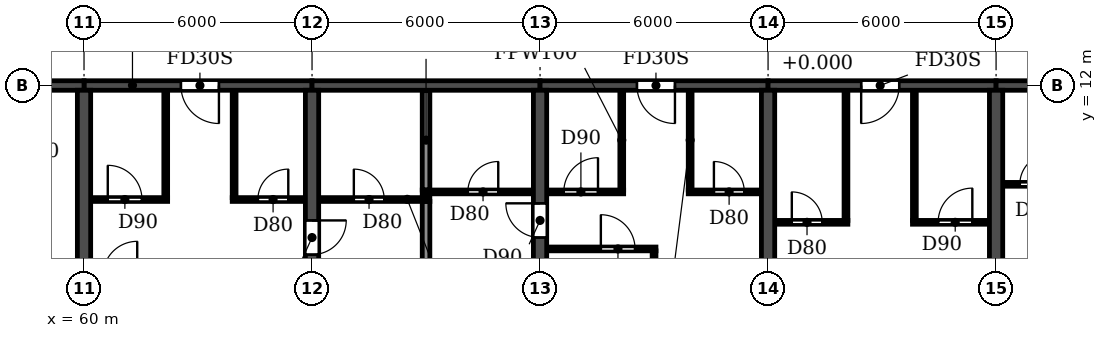
"""IFC4 building model, lengths in metres.
Left out: names, types, materials, properties, quantities, classifications, styles, units other than length and angle.
Written with IfcOpenShell. Run it as: python <this file> out.ifc"""

import sys

from ifc_helpers import new_model, si_unit, direction, frame, frame_2d, origin, place, context, subcontext, project, spatial, rectangle, extrude, element, fill, save


model = new_model("IFC4")
c1 = context("Model", 3, precision=1e-05, world=origin(), true_north=direction((0.0, 1.0)))
c2 = subcontext(c1, "Body", "Model", "MODEL_VIEW")
j1 = project(units=[si_unit("LENGTHUNIT", "METRE"), si_unit("PLANEANGLEUNIT", "RADIAN")], contexts=[c1])
p1 = place(None, origin())
s1 = spatial("IfcSite", under=j1, at=p1, CompositionType="ELEMENT")
p2 = place(p1, origin())
s2 = spatial("IfcBuilding", under=s1, at=p2, CompositionType="ELEMENT")
p3 = place(p2, frame((0.0, 0.0, 82.8)))
s3 = spatial("IfcBuildingStorey", under=s2, at=p3, CompositionType="ELEMENT", Elevation=82.8)
p4 = place(p3, frame((60.0, 0.2, 0.0), z_axis=(0.0, 0.0, 1.0), x_axis=(0.0, 1.0, 0.0)))
e1 = element("IfcWall", 1, at=p4, inside=s3, PredefinedType="SHEAR", context=c2, shape_type="SweptSolid", body=[
    extrude(rectangle(XDim=11.675, YDim=0.35, at=frame_2d((5.837, 0.0))), origin(), (0.0, 0.0, 1.0), 3.06),
])
p5 = place(p3, frame((66.0, 0.2, 0.0), z_axis=(0.0, 0.0, 1.0), x_axis=(0.0, 1.0, 0.0)))
e2 = element("IfcWall", 2, at=p5, inside=s3, PredefinedType="SHEAR", context=c2, shape_type="SweptSolid", body=[
    extrude(rectangle(XDim=11.675, YDim=0.35, at=frame_2d((5.837, 0.0))), origin(), (0.0, 0.0, 1.0), 3.06),
])
p6 = place(p5, frame((7.35, 0.0, 0.0)))
e3 = element("IfcOpeningElement", 3, at=p6, cuts=e2, PredefinedType="OPENING", context=c2, shape_type="SweptSolid", body=[
    extrude(rectangle(XDim=0.9, YDim=2.1, at=frame_2d((0.45, 1.05))), frame((0.0, 0.185, 0.0), z_axis=(0.0, -1.0, 0.0), x_axis=(1.0, 0.0, 0.0)), (0.0, 0.0, 1.0), 0.37),
])
p7 = place(p3, frame((72.0, 0.2, 0.0), z_axis=(0.0, 0.0, 1.0), x_axis=(0.0, 1.0, 0.0)))
e4 = element("IfcWall", 4, at=p7, inside=s3, PredefinedType="SHEAR", context=c2, shape_type="SweptSolid", body=[
    extrude(rectangle(XDim=11.675, YDim=0.35, at=frame_2d((5.837, 0.0))), origin(), (0.0, 0.0, 1.0), 3.06),
])
p8 = place(p7, frame((7.8, 0.0, 0.0)))
e5 = element("IfcOpeningElement", 5, at=p8, cuts=e4, PredefinedType="OPENING", context=c2, shape_type="SweptSolid", body=[
    extrude(rectangle(XDim=0.9, YDim=2.1, at=frame_2d((0.45, 1.05))), frame((0.0, 0.185, 0.0), z_axis=(0.0, -1.0, 0.0), x_axis=(1.0, 0.0, 0.0)), (0.0, 0.0, 1.0), 0.37),
])
for number, where, z_axis, x_axis in (
    (6, (78.0, 0.2, 0.0), (0.0, 0.0, 1.0), (0.0, 1.0, 0.0)),
    (7, (84.0, 0.2, 0.0), (0.0, 0.0, 1.0), (0.0, 1.0, 0.0)),
):
    element("IfcWall", number, at=place(p3, frame(where, z_axis=z_axis, x_axis=x_axis)), inside=s3, PredefinedType="SHEAR", context=c2, shape_type="SweptSolid", body=[
        extrude(rectangle(XDim=11.675, YDim=0.35, at=frame_2d((5.837, 0.0))), origin(), (0.0, 0.0, 1.0), 3.06),
    ])
p9 = place(p3, frame((54.0, 12.0, 0.0), z_axis=(0.0, 0.0, 1.0), x_axis=(1.0, 0.0, 0.0)))
e8 = element("IfcWall", 8, at=p9, inside=s3, PredefinedType="SHEAR", context=c2, shape_type="SweptSolid", body=[
    extrude(rectangle(XDim=6.0, YDim=0.25, at=frame_2d((3.0, 0.0))), origin(), (0.0, 0.0, 1.0), 2.46),
])
p10 = place(p9, frame((2.45, 0.0, 0.0)))
e9 = element("IfcOpeningElement", 9, at=p10, cuts=e8, PredefinedType="OPENING", context=c2, shape_type="SweptSolid", body=[
    extrude(rectangle(XDim=1.0, YDim=2.1, at=frame_2d((0.5, 1.05))), frame((0.0, 0.135, 0.0), z_axis=(0.0, -1.0, 0.0), x_axis=(1.0, 0.0, 0.0)), (0.0, 0.0, 1.0), 0.27),
])
p11 = place(p3, frame((60.0, 12.0, 0.0), z_axis=(0.0, 0.0, 1.0), x_axis=(1.0, 0.0, 0.0)))
e10 = element("IfcWall", 10, at=p11, inside=s3, PredefinedType="SHEAR", context=c2, shape_type="SweptSolid", body=[
    extrude(rectangle(XDim=6.0, YDim=0.25, at=frame_2d((3.0, 0.0))), origin(), (0.0, 0.0, 1.0), 2.46),
])
p12 = place(p11, frame((2.55, 0.0, 0.0)))
e11 = element("IfcOpeningElement", 11, at=p12, cuts=e10, PredefinedType="OPENING", context=c2, shape_type="SweptSolid", body=[
    extrude(rectangle(XDim=1.0, YDim=2.1, at=frame_2d((0.5, 1.05))), frame((0.0, 0.135, 0.0), z_axis=(0.0, -1.0, 0.0), x_axis=(1.0, 0.0, 0.0)), (0.0, 0.0, 1.0), 0.27),
])
p13 = place(p3, frame((66.0, 12.0, 0.0), z_axis=(0.0, 0.0, 1.0), x_axis=(1.0, 0.0, 0.0)))
e12 = element("IfcWall", 12, at=p13, inside=s3, PredefinedType="SHEAR", context=c2, shape_type="SweptSolid", body=[
    extrude(rectangle(XDim=6.0, YDim=0.25, at=frame_2d((3.0, 0.0))), origin(), (0.0, 0.0, 1.0), 2.46),
])
p14 = place(p3, frame((72.0, 12.0, 0.0), z_axis=(0.0, 0.0, 1.0), x_axis=(1.0, 0.0, 0.0)))
e13 = element("IfcWall", 13, at=p14, inside=s3, PredefinedType="SHEAR", context=c2, shape_type="SweptSolid", body=[
    extrude(rectangle(XDim=6.0, YDim=0.25, at=frame_2d((3.0, 0.0))), origin(), (0.0, 0.0, 1.0), 2.46),
])
p15 = place(p14, frame((2.55, 0.0, 0.0)))
e14 = element("IfcOpeningElement", 14, at=p15, cuts=e13, PredefinedType="OPENING", context=c2, shape_type="SweptSolid", body=[
    extrude(rectangle(XDim=1.0, YDim=2.1, at=frame_2d((0.5, 1.05))), frame((0.0, 0.135, 0.0), z_axis=(0.0, -1.0, 0.0), x_axis=(1.0, 0.0, 0.0)), (0.0, 0.0, 1.0), 0.27),
])
p16 = place(p3, frame((78.0, 12.0, 0.0), z_axis=(0.0, 0.0, 1.0), x_axis=(1.0, 0.0, 0.0)))
e15 = element("IfcWall", 15, at=p16, inside=s3, PredefinedType="SHEAR", context=c2, shape_type="SweptSolid", body=[
    extrude(rectangle(XDim=6.0, YDim=0.25, at=frame_2d((3.0, 0.0))), origin(), (0.0, 0.0, 1.0), 2.46),
])
p17 = place(p16, frame((2.45, 0.0, 0.0)))
e16 = element("IfcOpeningElement", 16, at=p17, cuts=e15, PredefinedType="OPENING", context=c2, shape_type="SweptSolid", body=[
    extrude(rectangle(XDim=1.0, YDim=2.1, at=frame_2d((0.5, 1.05))), frame((0.0, 0.135, 0.0), z_axis=(0.0, -1.0, 0.0), x_axis=(1.0, 0.0, 0.0)), (0.0, 0.0, 1.0), 0.27),
])
p18 = place(p3, frame((84.0, 12.0, 0.0), z_axis=(0.0, 0.0, 1.0), x_axis=(1.0, 0.0, 0.0)))
e17 = element("IfcWall", 17, at=p18, inside=s3, PredefinedType="SHEAR", context=c2, shape_type="SweptSolid", body=[
    extrude(rectangle(XDim=6.0, YDim=0.25, at=frame_2d((3.0, 0.0))), origin(), (0.0, 0.0, 1.0), 2.46),
])
p19 = place(p18, frame((2.45, 0.0, 0.0)))
e18 = element("IfcOpeningElement", 18, at=p19, cuts=e17, PredefinedType="OPENING", context=c2, shape_type="SweptSolid", body=[
    extrude(rectangle(XDim=1.0, YDim=2.1, at=frame_2d((0.5, 1.05))), frame((0.0, 0.135, 0.0), z_axis=(0.0, -1.0, 0.0), x_axis=(1.0, 0.0, 0.0)), (0.0, 0.0, 1.0), 0.27),
])
p20 = place(p3, frame((69.0, 0.06, 0.0), z_axis=(0.0, 0.0, 1.0), x_axis=(0.0, 1.0, 0.0)))
e19 = element("IfcWall", 19, at=p20, inside=s3, PredefinedType="PARTITIONING", context=c2, shape_type="SweptSolid", body=[
    extrude(rectangle(XDim=8.89, YDim=0.2, at=frame_2d((4.445, 0.0))), origin(), (0.0, 0.0, 1.0), 3.06),
])
p21 = place(p3, frame((69.0, 9.25, 0.0), z_axis=(0.0, 0.0, 1.0), x_axis=(0.0, 1.0, 0.0)))
e20 = element("IfcWall", 20, at=p21, inside=s3, PredefinedType="PARTITIONING", context=c2, shape_type="SweptSolid", body=[
    extrude(rectangle(XDim=2.615, YDim=0.2, at=frame_2d((1.308, 0.0))), origin(), (0.0, 0.0, 1.0), 3.06),
])
p22 = place(p3, frame((72.185, 7.7, 0.0), z_axis=(0.0, 0.0, 1.0), x_axis=(1.0, 0.0, 0.0)))
e21 = element("IfcWall", 21, at=p22, inside=s3, PredefinedType="PARTITIONING", context=c2, shape_type="SweptSolid", body=[
    extrude(rectangle(XDim=2.865, YDim=0.1, at=frame_2d((1.433, 0.0))), origin(), (0.0, 0.0, 1.0), 3.06),
])
p23 = place(p22, frame((1.415, 0.0, 0.0)))
e22 = element("IfcOpeningElement", 22, at=p23, cuts=e21, PredefinedType="OPENING", context=c2, shape_type="SweptSolid", body=[
    extrude(rectangle(XDim=0.9, YDim=2.1, at=frame_2d((0.45, 1.05))), frame((0.0, 0.06, 0.0), z_axis=(0.0, -1.0, 0.0), x_axis=(1.0, 0.0, 0.0)), (0.0, 0.0, 1.0), 0.12),
])
p24 = place(p3, frame((78.185, 8.4, 0.0), z_axis=(0.0, 0.0, 1.0), x_axis=(1.0, 0.0, 0.0)))
e23 = element("IfcWall", 23, at=p24, inside=s3, PredefinedType="PARTITIONING", context=c2, shape_type="SweptSolid", body=[
    extrude(rectangle(XDim=1.915, YDim=0.1, at=frame_2d((0.958, 0.0))), origin(), (0.0, 0.0, 1.0), 3.06),
])
p25 = place(p24, frame((0.44, 0.0, 0.0)))
e24 = element("IfcOpeningElement", 24, at=p25, cuts=e23, PredefinedType="OPENING", context=c2, shape_type="SweptSolid", body=[
    extrude(rectangle(XDim=0.8, YDim=2.1, at=frame_2d((0.4, 1.05))), frame((0.0, 0.06, 0.0), z_axis=(0.0, -1.0, 0.0), x_axis=(1.0, 0.0, 0.0)), (0.0, 0.0, 1.0), 0.12),
])
p26 = place(p3, frame((81.8, 8.4, 0.0), z_axis=(0.0, 0.0, 1.0), x_axis=(1.0, 0.0, 0.0)))
e25 = element("IfcWall", 25, at=p26, inside=s3, PredefinedType="PARTITIONING", context=c2, shape_type="SweptSolid", body=[
    extrude(rectangle(XDim=2.015, YDim=0.1, at=frame_2d((1.007, 0.0))), origin(), (0.0, 0.0, 1.0), 3.06),
])
p27 = place(p26, frame((0.675, 0.0, 0.0)))
e26 = element("IfcOpeningElement", 26, at=p27, cuts=e25, PredefinedType="OPENING", context=c2, shape_type="SweptSolid", body=[
    extrude(rectangle(XDim=0.9, YDim=2.1, at=frame_2d((0.45, 1.05))), frame((0.0, 0.06, 0.0), z_axis=(0.0, -1.0, 0.0), x_axis=(1.0, 0.0, 0.0)), (0.0, 0.0, 1.0), 0.12),
])
p28 = place(p3, frame((60.185, 9.0, 0.0), z_axis=(0.0, 0.0, 1.0), x_axis=(1.0, 0.0, 0.0)))
e27 = element("IfcWall", 27, at=p28, inside=s3, PredefinedType="PARTITIONING", context=c2, shape_type="SweptSolid", body=[
    extrude(rectangle(XDim=2.015, YDim=0.1, at=frame_2d((1.007, 0.0))), origin(), (0.0, 0.0, 1.0), 3.06),
])
p29 = place(p28, frame((0.44, 0.0, 0.0)))
e28 = element("IfcOpeningElement", 28, at=p29, cuts=e27, PredefinedType="OPENING", context=c2, shape_type="SweptSolid", body=[
    extrude(rectangle(XDim=0.9, YDim=2.1, at=frame_2d((0.45, 1.05))), frame((0.0, 0.06, 0.0), z_axis=(0.0, -1.0, 0.0), x_axis=(1.0, 0.0, 0.0)), (0.0, 0.0, 1.0), 0.12),
])
p30 = place(p3, frame((63.9, 9.0, 0.0), z_axis=(0.0, 0.0, 1.0), x_axis=(1.0, 0.0, 0.0)))
e29 = element("IfcWall", 29, at=p30, inside=s3, PredefinedType="PARTITIONING", context=c2, shape_type="SweptSolid", body=[
    extrude(rectangle(XDim=1.915, YDim=0.1, at=frame_2d((0.958, 0.0))), origin(), (0.0, 0.0, 1.0), 3.06),
])
p31 = place(p30, frame((0.675, 0.0, 0.0)))
e30 = element("IfcOpeningElement", 30, at=p31, cuts=e29, PredefinedType="OPENING", context=c2, shape_type="SweptSolid", body=[
    extrude(rectangle(XDim=0.8, YDim=2.1, at=frame_2d((0.4, 1.05))), frame((0.0, 0.06, 0.0), z_axis=(0.0, -1.0, 0.0), x_axis=(1.0, 0.0, 0.0)), (0.0, 0.0, 1.0), 0.12),
])
p32 = place(p3, frame((66.185, 9.0, 0.0), z_axis=(0.0, 0.0, 1.0), x_axis=(1.0, 0.0, 0.0)))
e31 = element("IfcWall", 31, at=p32, inside=s3, PredefinedType="PARTITIONING", context=c2, shape_type="SweptSolid", body=[
    extrude(rectangle(XDim=2.915, YDim=0.1, at=frame_2d((1.458, 0.0))), origin(), (0.0, 0.0, 1.0), 3.06),
])
p33 = place(p32, frame((0.915, 0.0, 0.0)))
e32 = element("IfcOpeningElement", 32, at=p33, cuts=e31, PredefinedType="OPENING", context=c2, shape_type="SweptSolid", body=[
    extrude(rectangle(XDim=0.8, YDim=2.1, at=frame_2d((0.4, 1.05))), frame((0.0, 0.06, 0.0), z_axis=(0.0, -1.0, 0.0), x_axis=(1.0, 0.0, 0.0)), (0.0, 0.0, 1.0), 0.12),
])
p34 = place(p3, frame((68.9, 9.2, 0.0), z_axis=(0.0, 0.0, 1.0), x_axis=(1.0, 0.0, 0.0)))
e33 = element("IfcWall", 33, at=p34, inside=s3, PredefinedType="PARTITIONING", context=c2, shape_type="SweptSolid", body=[
    extrude(rectangle(XDim=2.915, YDim=0.1, at=frame_2d((1.458, 0.0))), origin(), (0.0, 0.0, 1.0), 3.06),
])
p35 = place(p34, frame((1.2, 0.0, 0.0)))
e34 = element("IfcOpeningElement", 34, at=p35, cuts=e33, PredefinedType="OPENING", context=c2, shape_type="SweptSolid", body=[
    extrude(rectangle(XDim=0.8, YDim=2.1, at=frame_2d((0.4, 1.05))), frame((0.0, 0.06, 0.0), z_axis=(0.0, -1.0, 0.0), x_axis=(1.0, 0.0, 0.0)), (0.0, 0.0, 1.0), 0.12),
])
p36 = place(p3, frame((72.185, 9.2, 0.0), z_axis=(0.0, 0.0, 1.0), x_axis=(1.0, 0.0, 0.0)))
e35 = element("IfcWall", 35, at=p36, inside=s3, PredefinedType="PARTITIONING", context=c2, shape_type="SweptSolid", body=[
    extrude(rectangle(XDim=2.015, YDim=0.1, at=frame_2d((1.007, 0.0))), origin(), (0.0, 0.0, 1.0), 3.06),
])
p37 = place(p36, frame((0.44, 0.0, 0.0)))
e36 = element("IfcOpeningElement", 36, at=p37, cuts=e35, PredefinedType="OPENING", context=c2, shape_type="SweptSolid", body=[
    extrude(rectangle(XDim=0.9, YDim=2.1, at=frame_2d((0.45, 1.05))), frame((0.0, 0.06, 0.0), z_axis=(0.0, -1.0, 0.0), x_axis=(1.0, 0.0, 0.0)), (0.0, 0.0, 1.0), 0.12),
])
p38 = place(p3, frame((75.9, 9.2, 0.0), z_axis=(0.0, 0.0, 1.0), x_axis=(1.0, 0.0, 0.0)))
e37 = element("IfcWall", 37, at=p38, inside=s3, PredefinedType="PARTITIONING", context=c2, shape_type="SweptSolid", body=[
    extrude(rectangle(XDim=1.915, YDim=0.1, at=frame_2d((0.958, 0.0))), origin(), (0.0, 0.0, 1.0), 3.06),
])
p39 = place(p38, frame((0.675, 0.0, 0.0)))
e38 = element("IfcOpeningElement", 38, at=p39, cuts=e37, PredefinedType="OPENING", context=c2, shape_type="SweptSolid", body=[
    extrude(rectangle(XDim=0.8, YDim=2.1, at=frame_2d((0.4, 1.05))), frame((0.0, 0.06, 0.0), z_axis=(0.0, -1.0, 0.0), x_axis=(1.0, 0.0, 0.0)), (0.0, 0.0, 1.0), 0.12),
])
p40 = place(p3, frame((84.185, 9.4, 0.0), z_axis=(0.0, 0.0, 1.0), x_axis=(1.0, 0.0, 0.0)))
e39 = element("IfcWall", 39, at=p40, inside=s3, PredefinedType="PARTITIONING", context=c2, shape_type="SweptSolid", body=[
    extrude(rectangle(XDim=1.915, YDim=0.1, at=frame_2d((0.958, 0.0))), origin(), (0.0, 0.0, 1.0), 3.06),
])
p41 = place(p40, frame((0.44, 0.0, 0.0)))
e40 = element("IfcOpeningElement", 40, at=p41, cuts=e39, PredefinedType="OPENING", context=c2, shape_type="SweptSolid", body=[
    extrude(rectangle(XDim=0.8, YDim=2.1, at=frame_2d((0.4, 1.05))), frame((0.0, 0.06, 0.0), z_axis=(0.0, -1.0, 0.0), x_axis=(1.0, 0.0, 0.0)), (0.0, 0.0, 1.0), 0.12),
])
for number, where, z_axis, x_axis in (
    (41, (62.15, 9.05, 0.0), (0.0, 0.0, 1.0), (0.0, 1.0, 0.0)),
    (42, (63.95, 9.05, 0.0), (0.0, 0.0, 1.0), (0.0, 1.0, 0.0)),
):
    element("IfcWall", number, at=place(p3, frame(where, z_axis=z_axis, x_axis=x_axis)), inside=s3, PredefinedType="PARTITIONING", context=c2, shape_type="SweptSolid", body=[
        extrude(rectangle(XDim=2.815, YDim=0.1, at=frame_2d((1.407, 0.0))), origin(), (0.0, 0.0, 1.0), 3.06),
    ])
p42 = place(p3, frame((74.15, 9.25, 0.0), z_axis=(0.0, 0.0, 1.0), x_axis=(0.0, 1.0, 0.0)))
e43 = element("IfcWall", 43, at=p42, inside=s3, PredefinedType="PARTITIONING", context=c2, shape_type="SweptSolid", body=[
    extrude(rectangle(XDim=2.615, YDim=0.1, at=frame_2d((1.308, 0.0))), origin(), (0.0, 0.0, 1.0), 3.06),
])
p43 = place(p3, frame((75.0, 0.06, 0.0), z_axis=(0.0, 0.0, 1.0), x_axis=(0.0, 1.0, 0.0)))
e44 = element("IfcWall", 44, at=p43, inside=s3, PredefinedType="PARTITIONING", context=c2, shape_type="SweptSolid", body=[
    extrude(rectangle(XDim=7.59, YDim=0.1, at=frame_2d((3.795, 0.0))), origin(), (0.0, 0.0, 1.0), 3.06),
])
p44 = place(p3, frame((75.95, 9.25, 0.0), z_axis=(0.0, 0.0, 1.0), x_axis=(0.0, 1.0, 0.0)))
e45 = element("IfcWall", 45, at=p44, inside=s3, PredefinedType="PARTITIONING", context=c2, shape_type="SweptSolid", body=[
    extrude(rectangle(XDim=2.615, YDim=0.1, at=frame_2d((1.308, 0.0))), origin(), (0.0, 0.0, 1.0), 3.06),
])
for number, where, z_axis, x_axis in (
    (46, (80.05, 8.45, 0.0), (0.0, 0.0, 1.0), (0.0, 1.0, 0.0)),
    (47, (81.85, 8.45, 0.0), (0.0, 0.0, 1.0), (0.0, 1.0, 0.0)),
):
    element("IfcWall", number, at=place(p3, frame(where, z_axis=z_axis, x_axis=x_axis)), inside=s3, PredefinedType="PARTITIONING", context=c2, shape_type="SweptSolid", body=[
        extrude(rectangle(XDim=3.415, YDim=0.1, at=frame_2d((1.708, 0.0))), origin(), (0.0, 0.0, 1.0), 3.06),
    ])
p45 = place(p33, origin())
e48 = element("IfcDoor", 48, at=p45, inside=s3, OperationType="SINGLE_SWING_LEFT", PredefinedType="DOOR", context=c2, shape_type="SweptSolid", body=[
    extrude(rectangle(XDim=0.8, YDim=2.1, at=frame_2d((0.4, 1.05))), frame((0.0, 0.025, 0.0), z_axis=(0.0, -1.0, 0.0), x_axis=(1.0, 0.0, 0.0)), (0.0, 0.0, 1.0), 0.05),
])
fill(e32, e48)
p46 = place(p29, origin())
e49 = element("IfcDoor", 49, at=p46, inside=s3, OperationType="SINGLE_SWING_LEFT", PredefinedType="DOOR", context=c2, shape_type="SweptSolid", body=[
    extrude(rectangle(XDim=0.9, YDim=2.1, at=frame_2d((0.45, 1.05))), frame((0.0, 0.025, 0.0), z_axis=(0.0, -1.0, 0.0), x_axis=(1.0, 0.0, 0.0)), (0.0, 0.0, 1.0), 0.05),
])
fill(e28, e49)
p47 = place(p12, frame((1.0, 0.0, 0.0), z_axis=(0.0, 0.0, 1.0), x_axis=(-1.0, 0.0, 0.0)))
e50 = element("IfcDoor", 50, at=p47, inside=s3, OperationType="SINGLE_SWING_LEFT", PredefinedType="DOOR", context=c2, shape_type="SweptSolid", body=[
    extrude(rectangle(XDim=1.0, YDim=2.1, at=frame_2d((0.5, 1.05))), frame((0.0, 0.025, 0.0), z_axis=(0.0, -1.0, 0.0), x_axis=(1.0, 0.0, 0.0)), (0.0, 0.0, 1.0), 0.05),
])
fill(e11, e50)
p48 = place(p31, origin())
e51 = element("IfcDoor", 51, at=p48, inside=s3, OperationType="SINGLE_SWING_RIGHT", PredefinedType="DOOR", context=c2, shape_type="SweptSolid", body=[
    extrude(rectangle(XDim=0.8, YDim=2.1, at=frame_2d((0.4, 1.05))), frame((0.0, 0.025, 0.0), z_axis=(0.0, -1.0, 0.0), x_axis=(1.0, 0.0, 0.0)), (0.0, 0.0, 1.0), 0.05),
])
fill(e30, e51)
p49 = place(p6, frame((0.9, 0.0, 0.0), z_axis=(0.0, 0.0, 1.0), x_axis=(-1.0, 0.0, 0.0)))
e52 = element("IfcDoor", 52, at=p49, inside=s3, OperationType="SINGLE_SWING_LEFT", PredefinedType="DOOR", context=c2, shape_type="SweptSolid", body=[
    extrude(rectangle(XDim=0.9, YDim=2.1, at=frame_2d((0.45, 1.05))), frame((0.0, 0.025, 0.0), z_axis=(0.0, -1.0, 0.0), x_axis=(1.0, 0.0, 0.0)), (0.0, 0.0, 1.0), 0.05),
])
fill(e3, e52)
p50 = place(p35, origin())
e53 = element("IfcDoor", 53, at=p50, inside=s3, OperationType="SINGLE_SWING_RIGHT", PredefinedType="DOOR", context=c2, shape_type="SweptSolid", body=[
    extrude(rectangle(XDim=0.8, YDim=2.1, at=frame_2d((0.4, 1.05))), frame((0.0, 0.025, 0.0), z_axis=(0.0, -1.0, 0.0), x_axis=(1.0, 0.0, 0.0)), (0.0, 0.0, 1.0), 0.05),
])
fill(e34, e53)
p51 = place(p8, origin())
e54 = element("IfcDoor", 54, at=p51, inside=s3, OperationType="SINGLE_SWING_RIGHT", PredefinedType="DOOR", context=c2, shape_type="SweptSolid", body=[
    extrude(rectangle(XDim=0.9, YDim=2.1, at=frame_2d((0.45, 1.05))), frame((0.0, 0.025, 0.0), z_axis=(0.0, -1.0, 0.0), x_axis=(1.0, 0.0, 0.0)), (0.0, 0.0, 1.0), 0.05),
])
fill(e5, e54)
p52 = place(p37, origin())
e55 = element("IfcDoor", 55, at=p52, inside=s3, OperationType="SINGLE_SWING_RIGHT", PredefinedType="DOOR", context=c2, shape_type="SweptSolid", body=[
    extrude(rectangle(XDim=0.9, YDim=2.1, at=frame_2d((0.45, 1.05))), frame((0.0, 0.025, 0.0), z_axis=(0.0, -1.0, 0.0), x_axis=(1.0, 0.0, 0.0)), (0.0, 0.0, 1.0), 0.05),
])
fill(e36, e55)
p53 = place(p23, origin())
e56 = element("IfcDoor", 56, at=p53, inside=s3, OperationType="SINGLE_SWING_LEFT", PredefinedType="DOOR", context=c2, shape_type="SweptSolid", body=[
    extrude(rectangle(XDim=0.9, YDim=2.1, at=frame_2d((0.45, 1.05))), frame((0.0, 0.025, 0.0), z_axis=(0.0, -1.0, 0.0), x_axis=(1.0, 0.0, 0.0)), (0.0, 0.0, 1.0), 0.05),
])
fill(e22, e56)
p54 = place(p15, frame((1.0, 0.0, 0.0), z_axis=(0.0, 0.0, 1.0), x_axis=(-1.0, 0.0, 0.0)))
e57 = element("IfcDoor", 57, at=p54, inside=s3, OperationType="SINGLE_SWING_LEFT", PredefinedType="DOOR", context=c2, shape_type="SweptSolid", body=[
    extrude(rectangle(XDim=1.0, YDim=2.1, at=frame_2d((0.5, 1.05))), frame((0.0, 0.025, 0.0), z_axis=(0.0, -1.0, 0.0), x_axis=(1.0, 0.0, 0.0)), (0.0, 0.0, 1.0), 0.05),
])
fill(e14, e57)
p55 = place(p39, origin())
e58 = element("IfcDoor", 58, at=p55, inside=s3, OperationType="SINGLE_SWING_LEFT", PredefinedType="DOOR", context=c2, shape_type="SweptSolid", body=[
    extrude(rectangle(XDim=0.8, YDim=2.1, at=frame_2d((0.4, 1.05))), frame((0.0, 0.025, 0.0), z_axis=(0.0, -1.0, 0.0), x_axis=(1.0, 0.0, 0.0)), (0.0, 0.0, 1.0), 0.05),
])
fill(e38, e58)
p56 = place(p25, origin())
e59 = element("IfcDoor", 59, at=p56, inside=s3, OperationType="SINGLE_SWING_LEFT", PredefinedType="DOOR", context=c2, shape_type="SweptSolid", body=[
    extrude(rectangle(XDim=0.8, YDim=2.1, at=frame_2d((0.4, 1.05))), frame((0.0, 0.025, 0.0), z_axis=(0.0, -1.0, 0.0), x_axis=(1.0, 0.0, 0.0)), (0.0, 0.0, 1.0), 0.05),
])
fill(e24, e59)
p57 = place(p17, frame((1.0, 0.0, 0.0), z_axis=(0.0, 0.0, 1.0), x_axis=(-1.0, 0.0, 0.0)))
e60 = element("IfcDoor", 60, at=p57, inside=s3, OperationType="SINGLE_SWING_RIGHT", PredefinedType="DOOR", context=c2, shape_type="SweptSolid", body=[
    extrude(rectangle(XDim=1.0, YDim=2.1, at=frame_2d((0.5, 1.05))), frame((0.0, 0.025, 0.0), z_axis=(0.0, -1.0, 0.0), x_axis=(1.0, 0.0, 0.0)), (0.0, 0.0, 1.0), 0.05),
])
fill(e16, e60)
p58 = place(p27, origin())
e61 = element("IfcDoor", 61, at=p58, inside=s3, OperationType="SINGLE_SWING_RIGHT", PredefinedType="DOOR", context=c2, shape_type="SweptSolid", body=[
    extrude(rectangle(XDim=0.9, YDim=2.1, at=frame_2d((0.45, 1.05))), frame((0.0, 0.025, 0.0), z_axis=(0.0, -1.0, 0.0), x_axis=(1.0, 0.0, 0.0)), (0.0, 0.0, 1.0), 0.05),
])
fill(e26, e61)
p59 = place(p41, origin())
e62 = element("IfcDoor", 62, at=p59, inside=s3, OperationType="SINGLE_SWING_RIGHT", PredefinedType="DOOR", context=c2, shape_type="SweptSolid", body=[
    extrude(rectangle(XDim=0.8, YDim=2.1, at=frame_2d((0.4, 1.05))), frame((0.0, 0.025, 0.0), z_axis=(0.0, -1.0, 0.0), x_axis=(1.0, 0.0, 0.0)), (0.0, 0.0, 1.0), 0.05),
])
fill(e40, e62)
save(model, sys.argv[1])
